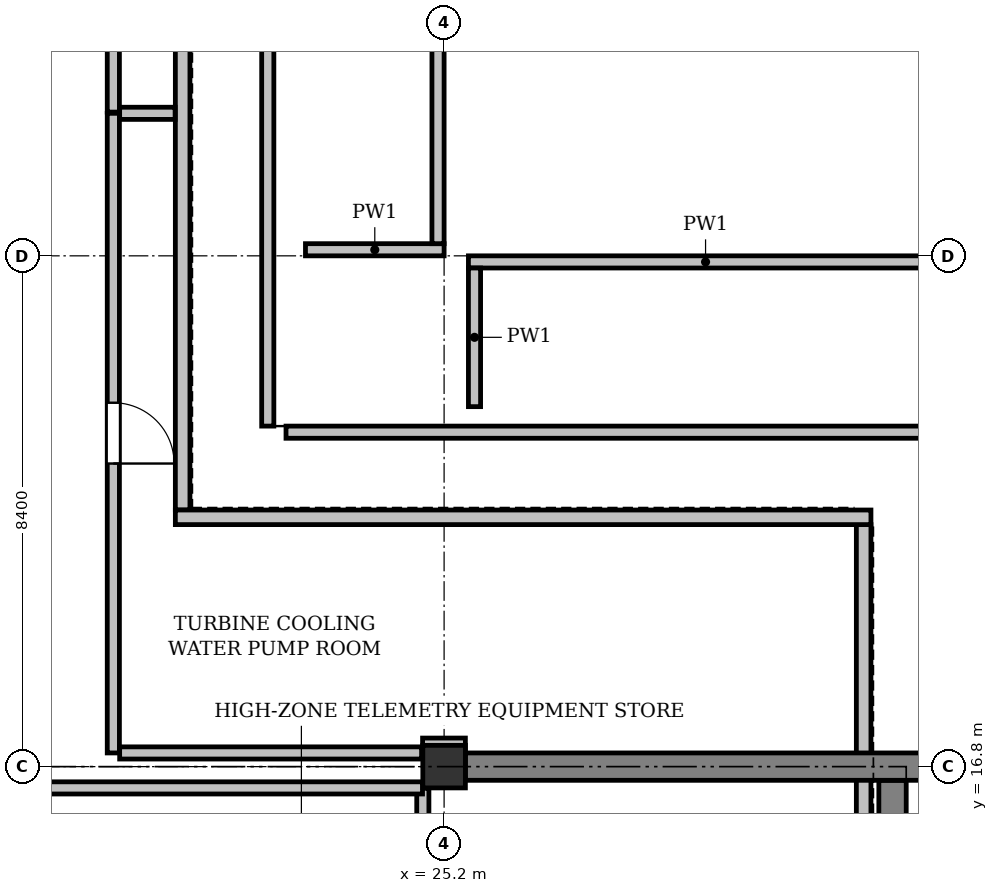
"""IFC4 building model, lengths in metres.
Left out: names, types, materials, properties, quantities, classifications, styles, units other than length and angle.
Written with IfcOpenShell. Run it as: python <this file> out.ifc"""

import sys

from ifc_helpers import new_model, si_unit, direction, frame, frame_2d, origin, origin_2d, place, context, subcontext, project, spatial, rectangle, extrude, element, fill, save


model = new_model("IFC4")
c1 = context("Model", 3, precision=1e-05, world=origin(), true_north=direction((0.0, 1.0)))
c2 = subcontext(c1, "Body", "Model", "MODEL_VIEW")
j1 = project(units=[si_unit("LENGTHUNIT", "METRE"), si_unit("PLANEANGLEUNIT", "RADIAN")], contexts=[c1])
p1 = place(None, origin())
s1 = spatial("IfcSite", under=j1, at=p1, CompositionType="ELEMENT")
p2 = place(p1, origin())
s2 = spatial("IfcBuilding", under=s1, at=p2, CompositionType="ELEMENT")
p3 = place(p2, frame((0.0, 0.0, 333.0)))
s3 = spatial("IfcBuildingStorey", under=s2, at=p3, CompositionType="ELEMENT", Elevation=333.0)
p4 = place(p3, frame((25.2, 16.8, 0.0), z_axis=(0.0, 0.0, 1.0), x_axis=(1.0, 0.0, 0.0)))
e1 = element("IfcColumn", 1, at=p4, inside=s3, PredefinedType="COLUMN", context=c2, shape_type="SweptSolid", body=[
    extrude(rectangle(XDim=0.7, YDim=0.7, at=origin_2d()), origin(), (0.0, 0.0, 1.0), 5.05),
])
p5 = place(p3, frame((33.4, 25.1, 0.0), z_axis=(0.0, 0.0, 1.0), x_axis=(-1.0, 0.0, 0.0)))
e2 = element("IfcWall", 2, at=p5, inside=s3, PredefinedType="PARAPET", context=c2, shape_type="SweptSolid", body=[
    extrude(rectangle(XDim=7.8, YDim=0.2, at=frame_2d((3.9, 0.0))), origin(), (0.0, 0.0, 1.0), 1.15),
])
for number, where, z_axis, x_axis in (
    (3, (25.7, 25.0, 0.0), (0.0, 0.0, 1.0), (0.0, -1.0, 0.0)),
    (4, (22.92, 25.3, 0.0), (0.0, 0.0, 1.0), (1.0, 0.0, 0.0)),
):
    element("IfcWall", number, at=place(p3, frame(where, z_axis=z_axis, x_axis=x_axis)), inside=s3, PredefinedType="PARAPET", context=c2, shape_type="SweptSolid", body=[
        extrude(rectangle(XDim=2.28, YDim=0.2, at=frame_2d((1.14, 0.0))), origin(), (0.0, 0.0, 1.0), 1.15),
    ])
p6 = place(p3, frame((25.1, 25.4, 0.0), z_axis=(0.0, 0.0, 1.0), x_axis=(0.0, 1.0, 0.0)))
e5 = element("IfcWall", 5, at=p6, inside=s3, PredefinedType="PARAPET", context=c2, shape_type="SweptSolid", body=[
    extrude(rectangle(XDim=12.4, YDim=0.2, at=frame_2d((6.2, 0.0))), origin(), (0.0, 0.0, 1.0), 1.15),
])
p7 = place(p3, frame((22.3, 38.6, 0.0), z_axis=(0.0, 0.0, 1.0), x_axis=(0.0, -1.0, 0.0)))
e6 = element("IfcWall", 6, at=p7, inside=s3, PredefinedType="PARAPET", context=c2, shape_type="SweptSolid", body=[
    extrude(rectangle(XDim=16.2, YDim=0.2, at=frame_2d((8.1, 0.0))), origin(), (0.0, 0.0, 1.0), 1.15),
])
p8 = place(p3, frame((22.6, 22.3, 0.0), z_axis=(0.0, 0.0, 1.0), x_axis=(1.0, 0.0, 0.0)))
e7 = element("IfcWall", 7, at=p8, inside=s3, PredefinedType="PARAPET", context=c2, shape_type="SweptSolid", body=[
    extrude(rectangle(XDim=11.0, YDim=0.2, at=frame_2d((5.5, 0.0))), origin(), (0.0, 0.0, 1.0), 1.15),
])
p9 = place(p3, frame((32.1, 20.78, 0.0), z_axis=(0.0, 0.0, 1.0), x_axis=(0.0, -1.0, 0.0)))
e8 = element("IfcWall", 8, at=p9, inside=s3, PredefinedType="STANDARD", context=c2, shape_type="SweptSolid", body=[
    extrude(rectangle(XDim=13.233, YDim=0.24, at=frame_2d((6.617, 0.0))), origin(), (0.0, 0.0, 1.0), 4.691),
])
p10 = place(p3, frame((20.9, 37.18, 0.0), z_axis=(0.0, 0.0, 1.0), x_axis=(0.0, -1.0, 0.0)))
e9 = element("IfcWall", 9, at=p10, inside=s3, PredefinedType="STANDARD", context=c2, shape_type="SweptSolid", body=[
    extrude(rectangle(XDim=16.16, YDim=0.24, at=frame_2d((8.08, 0.0))), origin(), (0.0, 0.0, 1.0), 5.05),
])
p11 = place(p3, frame((20.78, 20.9, 0.0), z_axis=(0.0, 0.0, 1.0), x_axis=(1.0, 0.0, 0.0)))
e10 = element("IfcWall", 10, at=p11, inside=s3, PredefinedType="STANDARD", context=c2, shape_type="SweptSolid", body=[
    extrude(rectangle(XDim=11.44, YDim=0.24, at=frame_2d((5.72, 0.0))), origin(), (0.0, 0.0, 1.0), 5.05),
])
p12 = place(p3, frame((32.575, 8.625, 0.0), z_axis=(0.0, 0.0, 1.0), x_axis=(0.0, 1.0, 0.0)))
e11 = element("IfcWall", 11, at=p12, inside=s3, PredefinedType="SHEAR", context=c2, shape_type="SweptSolid", body=[
    extrude(rectangle(XDim=7.95, YDim=0.45, at=frame_2d((3.975, 0.0))), origin(), (0.0, 0.0, 1.0), 5.05),
])
p13 = place(p3, frame((25.55, 16.8, 0.0), z_axis=(0.0, 0.0, 1.0), x_axis=(1.0, 0.0, 0.0)))
e12 = element("IfcWall", 12, at=p13, inside=s3, PredefinedType="SHEAR", context=c2, shape_type="SweptSolid", body=[
    extrude(rectangle(XDim=7.7, YDim=0.45, at=frame_2d((3.85, 0.0))), origin(), (0.0, 0.0, 1.0), 5.05),
])
p14 = place(p3, frame((24.85, 14.2, 0.0), z_axis=(0.0, 0.0, 1.0), x_axis=(0.0, 1.0, 0.0)))
e13 = element("IfcWall", 13, at=p14, inside=s3, PredefinedType="PARTITIONING", context=c2, shape_type="SweptSolid", body=[
    extrude(rectangle(XDim=2.245, YDim=0.2, at=frame_2d((1.123, 0.0))), origin(), (0.0, 0.0, 1.0), 5.05),
])
p15 = place(p3, frame((24.845, 16.45, 0.0), z_axis=(0.0, 0.0, 1.0), x_axis=(-1.0, 0.0, 0.0)))
e14 = element("IfcWall", 14, at=p15, inside=s3, PredefinedType="PARTITIONING", context=c2, shape_type="SweptSolid", body=[
    extrude(rectangle(XDim=7.645, YDim=0.2, at=frame_2d((3.823, 0.0))), origin(), (0.0, 0.0, 1.0), 5.05),
])
p16 = place(p3, frame((19.76, 27.544, 0.0), z_axis=(0.0, 0.0, 1.0), x_axis=(0.0, -1.0, 0.0)))
e15 = element("IfcWall", 15, at=p16, inside=s3, PredefinedType="PARTITIONING", context=c2, shape_type="SweptSolid", body=[
    extrude(rectangle(XDim=10.519, YDim=0.2, at=frame_2d((5.259, 0.0))), origin(), (0.0, 0.0, 1.0), 5.05),
])
p17 = place(p16, frame((4.76, 0.0, 0.0)))
e16 = element("IfcOpeningElement", 16, at=p17, cuts=e15, PredefinedType="OPENING", context=c2, shape_type="SweptSolid", body=[
    extrude(rectangle(XDim=1.0, YDim=2.15, at=frame_2d((0.5, 1.075))), frame((0.0, 0.11, 0.0), z_axis=(0.0, -1.0, 0.0), x_axis=(1.0, 0.0, 0.0)), (0.0, 0.0, 1.0), 0.22),
])
p18 = place(p3, frame((19.864, 17.025, 0.0), z_axis=(0.0, 0.0, 1.0), x_axis=(1.0, 0.0, 0.0)))
e17 = element("IfcWall", 17, at=p18, inside=s3, PredefinedType="PARTITIONING", context=c2, shape_type="SweptSolid", body=[
    extrude(rectangle(XDim=4.966, YDim=0.2, at=frame_2d((2.483, 0.0))), origin(), (0.0, 0.0, 1.0), 4.691),
])
p19 = place(p3, frame((24.846, 17.17, 0.0), z_axis=(0.0, 0.0, 1.0), x_axis=(0.999999939844, 0.000346860888, 0.0)))
e18 = element("IfcWall", 18, at=p19, inside=s3, PredefinedType="PARTITIONING", context=c2, shape_type="SweptSolid", body=[
    extrude(rectangle(XDim=0.704, YDim=0.2, at=frame_2d((0.352, 0.0))), origin(), (0.0, 0.0, 1.0), 5.05),
])
p20 = place(p3, frame((20.776, 27.544, 0.0), z_axis=(0.0, 0.0, 1.0), x_axis=(-1.0, 0.0, 0.0)))
e19 = element("IfcWall", 19, at=p20, inside=s3, PredefinedType="PARTITIONING", context=c2, shape_type="SweptSolid", body=[
    extrude(rectangle(XDim=0.912, YDim=0.2, at=frame_2d((0.456, 0.0))), origin(), (0.0, 0.0, 1.0), 5.05),
])
p21 = place(p3, frame((19.76, 37.176, 0.0), z_axis=(0.0, 0.0, 1.0), x_axis=(0.0, -1.0, 0.0)))
e20 = element("IfcWall", 20, at=p21, inside=s3, PredefinedType="PARTITIONING", context=c2, shape_type="SweptSolid", body=[
    extrude(rectangle(XDim=9.612, YDim=0.2, at=frame_2d((4.806, 0.0))), origin(), (0.0, 0.0, 1.0), 5.05),
])
p22 = place(p21, frame((4.306, 0.0, 0.0)))
e21 = element("IfcOpeningElement", 21, at=p22, cuts=e20, PredefinedType="OPENING", context=c2, shape_type="SweptSolid", body=[
    extrude(rectangle(XDim=1.0, YDim=2.15, at=frame_2d((0.5, 1.075))), frame((0.0, 0.11, 0.0), z_axis=(0.0, -1.0, 0.0), x_axis=(1.0, 0.0, 0.0)), (0.0, 0.0, 1.0), 0.22),
])
p23 = place(p17, origin())
e22 = element("IfcDoor", 22, at=p23, inside=s3, OperationType="SINGLE_SWING_RIGHT", PredefinedType="DOOR", context=c2, shape_type="SweptSolid", body=[
    extrude(rectangle(XDim=1.0, YDim=2.15, at=frame_2d((0.5, 1.075))), frame((0.0, 0.025, 0.0), z_axis=(0.0, -1.0, 0.0), x_axis=(1.0, 0.0, 0.0)), (0.0, 0.0, 1.0), 0.05),
])
fill(e16, e22)
save(model, sys.argv[1])
